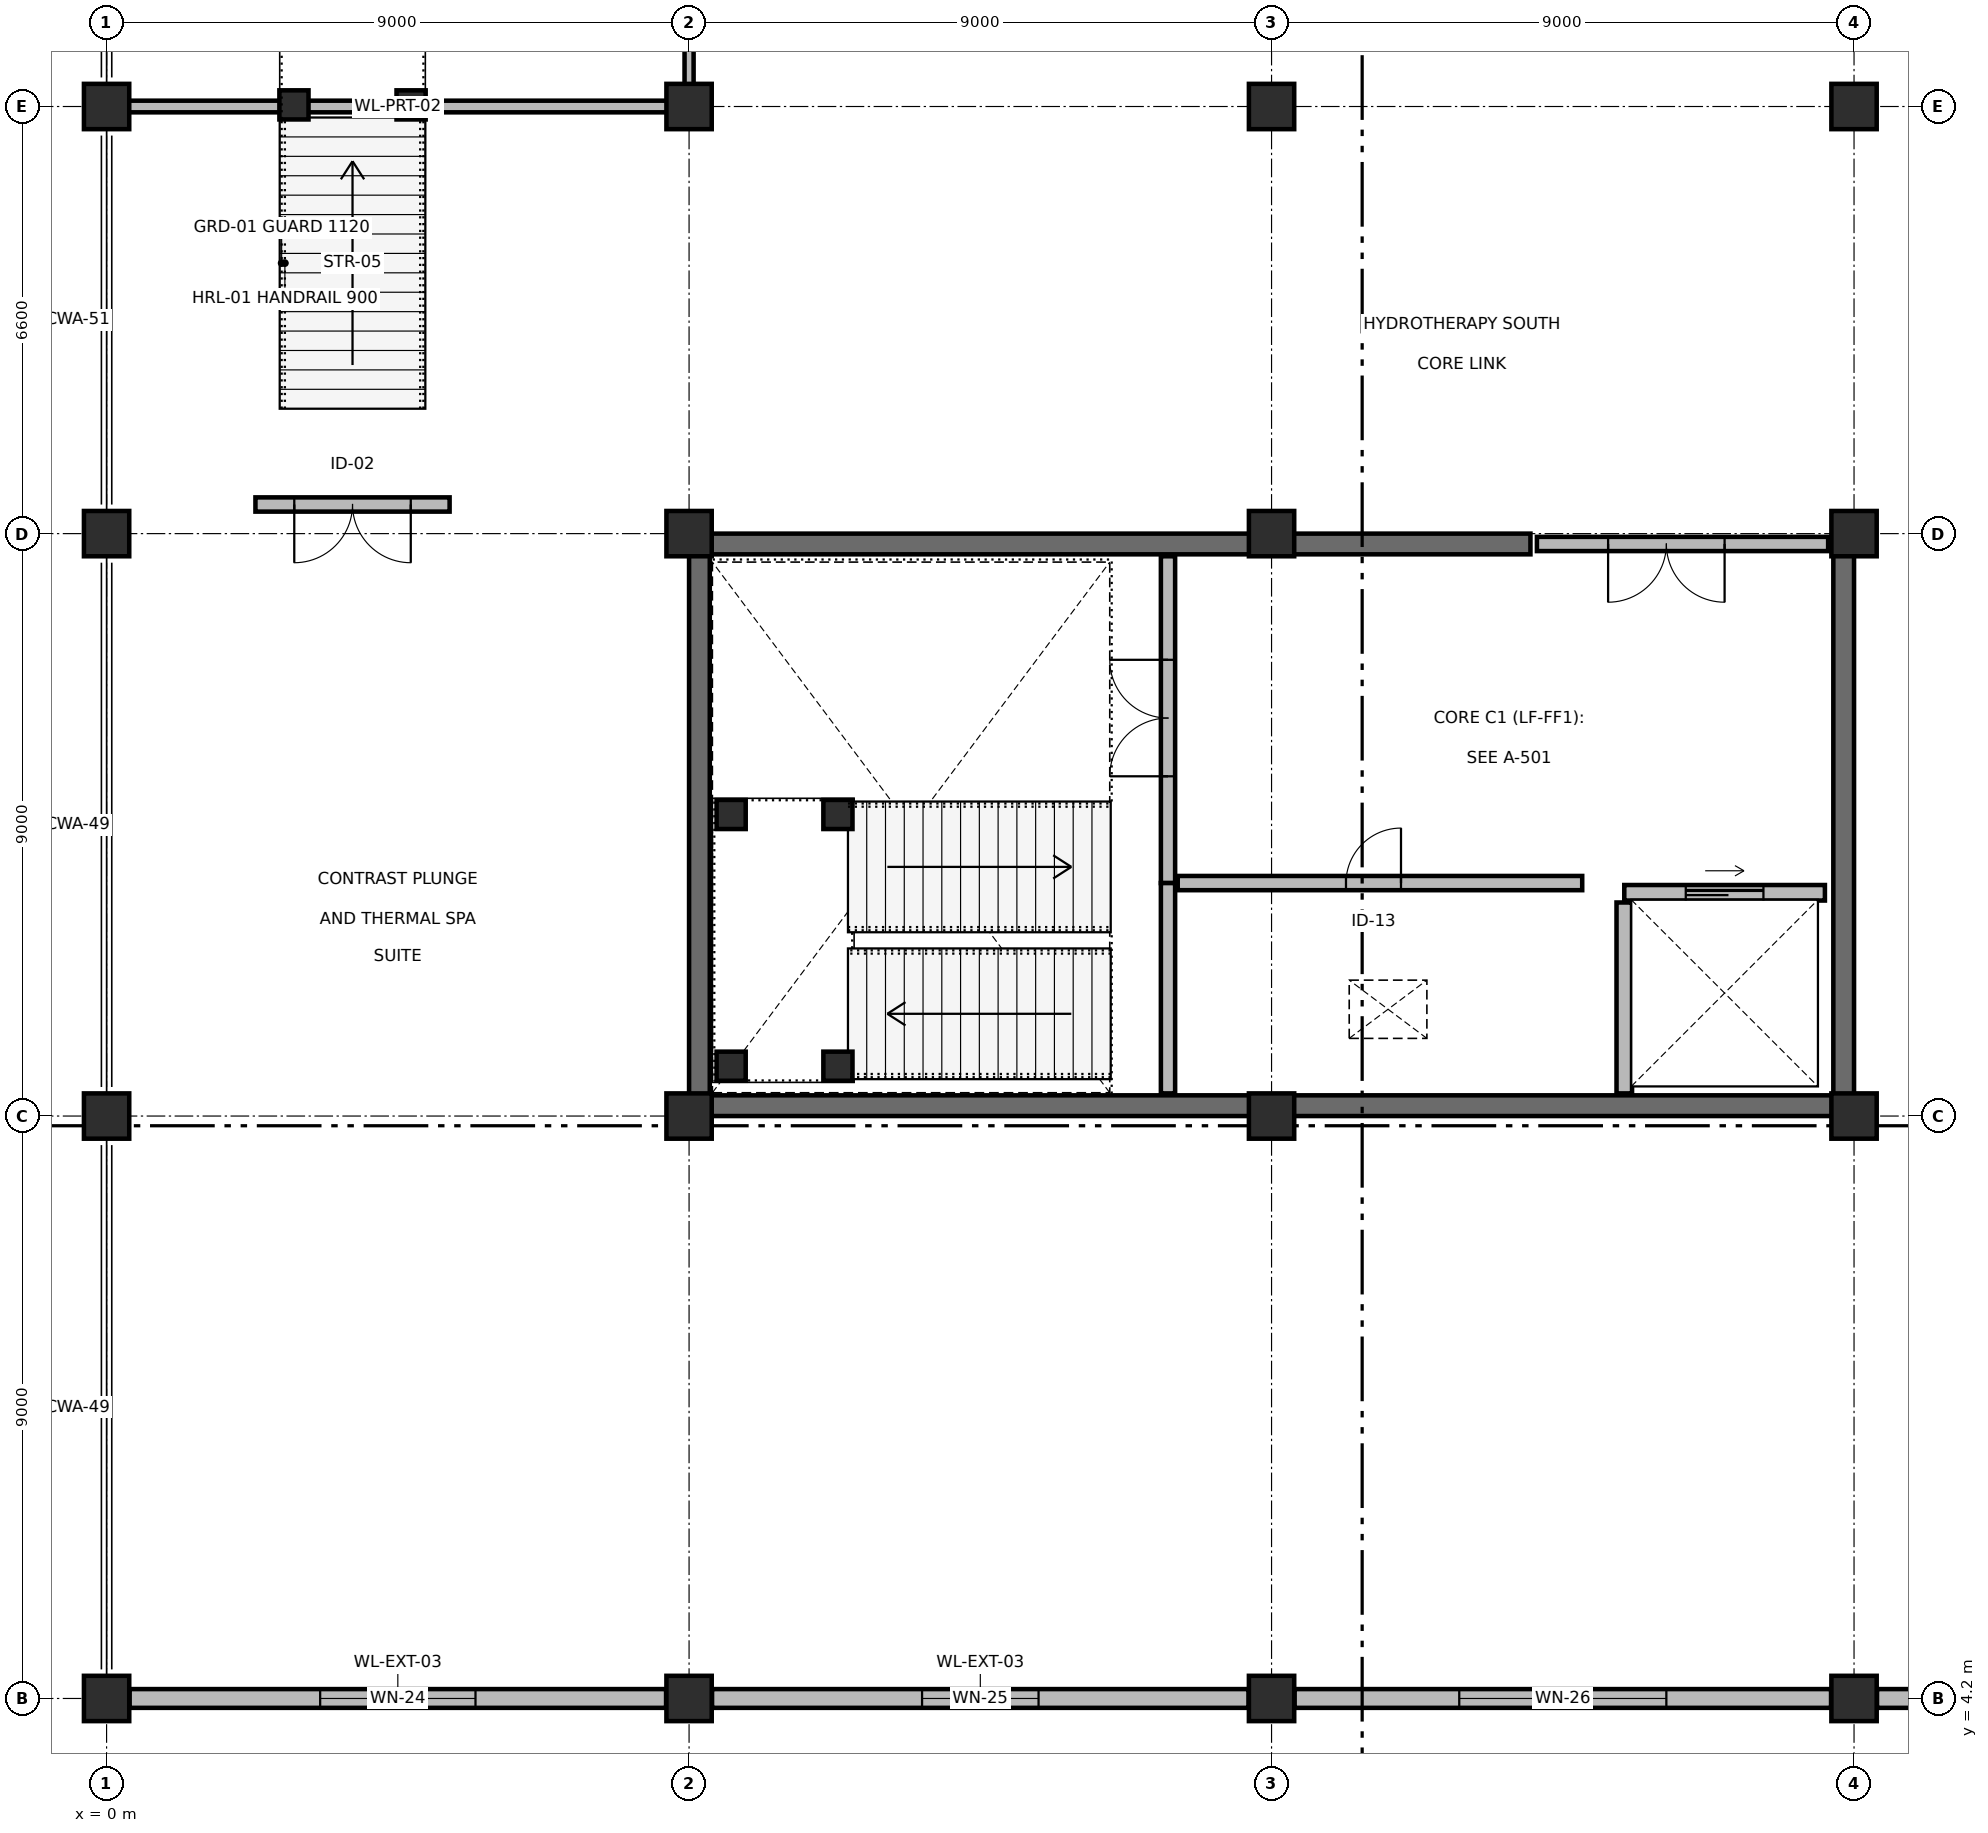
"""IFC4 building model, lengths in metres.
Left out: names, types, materials, properties, quantities, classifications, styles, units other than length and angle.
Written with IfcOpenShell. Run it as: python <this file> out.ifc"""

import sys

from ifc_helpers import new_model, si_unit, direction, frame, frame_2d, origin, origin_2d, place, context, subcontext, project, spatial, rectangle, extrude, element, fill, save


model = new_model("IFC4")
c1 = context("Model", 3, precision=1e-05, world=origin(), true_north=direction((0.0, 1.0)))
c2 = subcontext(c1, "Body", "Model", "MODEL_VIEW")
j1 = project(units=[si_unit("LENGTHUNIT", "METRE"), si_unit("PLANEANGLEUNIT", "RADIAN")], contexts=[c1])
p1 = place(None, origin())
s1 = spatial("IfcSite", under=j1, at=p1, CompositionType="ELEMENT")
p2 = place(p1, origin())
s2 = spatial("IfcBuilding", under=s1, at=p2, CompositionType="ELEMENT")
p3 = place(p2, frame((0.0, 0.0, 4.8)))
s3 = spatial("IfcBuildingStorey", under=s2, at=p3, CompositionType="ELEMENT", Elevation=4.8)
for number, where, z_axis, x_axis in (
    (1, (0.0, 4.2, 0.0), (0.0, 0.0, 1.0), (1.0, 0.0, 0.0)),
    (2, (0.0, 13.2, 0.0), (0.0, 0.0, 1.0), (1.0, 0.0, 0.0)),
    (3, (0.0, 22.2, 0.0), (0.0, 0.0, 1.0), (1.0, 0.0, 0.0)),
    (4, (0.0, 28.8, 0.0), (0.0, 0.0, 1.0), (1.0, 0.0, 0.0)),
    (5, (9.0, 4.2, 0.0), (0.0, 0.0, 1.0), (1.0, 0.0, 0.0)),
    (6, (9.0, 13.2, 0.0), (0.0, 0.0, 1.0), (1.0, 0.0, 0.0)),
    (7, (9.0, 22.2, 0.0), (0.0, 0.0, 1.0), (1.0, 0.0, 0.0)),
    (8, (9.0, 28.8, 0.0), (0.0, 0.0, 1.0), (1.0, 0.0, 0.0)),
    (9, (18.0, 4.2, 0.0), (0.0, 0.0, 1.0), (1.0, 0.0, 0.0)),
    (10, (18.0, 13.2, 0.0), (0.0, 0.0, 1.0), (1.0, 0.0, 0.0)),
    (11, (18.0, 22.2, 0.0), (0.0, 0.0, 1.0), (1.0, 0.0, 0.0)),
    (12, (18.0, 28.8, 0.0), (0.0, 0.0, 1.0), (1.0, 0.0, 0.0)),
    (13, (27.0, 4.2, 0.0), (0.0, 0.0, 1.0), (1.0, 0.0, 0.0)),
    (14, (27.0, 13.2, 0.0), (0.0, 0.0, 1.0), (1.0, 0.0, 0.0)),
    (15, (27.0, 22.2, 0.0), (0.0, 0.0, 1.0), (1.0, 0.0, 0.0)),
    (16, (27.0, 28.8, 0.0), (0.0, 0.0, 1.0), (1.0, 0.0, 0.0)),
):
    element("IfcColumn", number, at=place(p3, frame(where, z_axis=z_axis, x_axis=x_axis)), inside=s3, PredefinedType="COLUMN", context=c2, shape_type="SweptSolid", body=[
        extrude(rectangle(XDim=0.7, YDim=0.7, at=origin_2d()), origin(), (0.0, 0.0, 1.0), 4.8),
    ])
for number, where, z_axis, x_axis in (
    (17, (2.895, 28.825, 0.0), (0.0, 0.0, 1.0), (1.0, 0.0, 0.0)),
    (18, (4.705, 28.825, 0.0), (0.0, 0.0, 1.0), (1.0, 0.0, 0.0)),
):
    element("IfcColumn", number, at=place(p3, frame(where, z_axis=z_axis, x_axis=x_axis)), inside=s3, PredefinedType="COLUMN", context=c2, shape_type="SweptSolid", body=[
        extrude(rectangle(XDim=0.45, YDim=0.45, at=origin_2d()), origin(), (0.0, 0.0, 1.0), 2.24),
    ])
p4 = place(p3, frame((9.0, 13.36, 0.0), z_axis=(0.0, 0.0, 1.0), x_axis=(1.0, 0.0, 0.0)))
e19 = element("IfcWall", 19, at=p4, inside=s3, PredefinedType="SHEAR", context=c2, shape_type="SweptSolid", body=[
    extrude(rectangle(XDim=18.0, YDim=0.32, at=frame_2d((9.0, 0.0))), origin(), (0.0, 0.0, 1.0), 4.8),
])
p5 = place(p3, frame((9.0, 22.04, 0.0), z_axis=(0.0, 0.0, 1.0), x_axis=(1.0, 0.0, 0.0)))
e20 = element("IfcWall", 20, at=p5, inside=s3, PredefinedType="SHEAR", context=c2, shape_type="SweptSolid", body=[
    extrude(rectangle(XDim=13.0, YDim=0.32, at=frame_2d((6.5, 0.0))), origin(), (0.0, 0.0, 1.0), 4.8),
])
p6 = place(p3, frame((9.16, 13.52, 0.0), z_axis=(0.0, 0.0, 1.0), x_axis=(0.0, 1.0, 0.0)))
e21 = element("IfcWall", 21, at=p6, inside=s3, PredefinedType="SHEAR", context=c2, shape_type="SweptSolid", body=[
    extrude(rectangle(XDim=8.36, YDim=0.32, at=frame_2d((4.18, 0.0))), origin(), (0.0, 0.0, 1.0), 4.8),
])
p7 = place(p3, frame((26.84, 13.52, 0.0), z_axis=(0.0, 0.0, 1.0), x_axis=(0.0, 1.0, 0.0)))
e22 = element("IfcWall", 22, at=p7, inside=s3, PredefinedType="SHEAR", context=c2, shape_type="SweptSolid", body=[
    extrude(rectangle(XDim=8.48, YDim=0.32, at=frame_2d((4.24, 0.0))), origin(), (0.0, 0.0, 1.0), 4.8),
])
p8 = place(p3, frame((8.645, 4.2, 0.0), z_axis=(0.0, 0.0, 1.0), x_axis=(-1.0, 0.0, 0.0)))
e23 = element("IfcWall", 23, at=p8, inside=s3, PredefinedType="SOLIDWALL", context=c2, shape_type="SweptSolid", body=[
    extrude(rectangle(XDim=8.29, YDim=0.29, at=frame_2d((4.145, 0.0))), origin(), (0.0, 0.0, 1.0), 3.825),
])
p9 = place(p8, frame((2.945, 0.0, 0.85)))
e24 = element("IfcOpeningElement", 24, at=p9, cuts=e23, PredefinedType="OPENING", context=c2, shape_type="SweptSolid", body=[
    extrude(rectangle(XDim=2.4, YDim=2.0, at=frame_2d((1.2, 1.0))), frame((0.0, 0.155, 0.0), z_axis=(0.0, -1.0, 0.0), x_axis=(1.0, 0.0, 0.0)), (0.0, 0.0, 1.0), 0.31),
])
p10 = place(p3, frame((17.645, 4.2, 0.0), z_axis=(0.0, 0.0, 1.0), x_axis=(-1.0, 0.0, 0.0)))
e25 = element("IfcWall", 25, at=p10, inside=s3, PredefinedType="SOLIDWALL", context=c2, shape_type="SweptSolid", body=[
    extrude(rectangle(XDim=8.29, YDim=0.29, at=frame_2d((4.145, 0.0))), origin(), (0.0, 0.0, 1.0), 3.825),
])
p11 = place(p10, frame((3.245, 0.0, 0.85)))
e26 = element("IfcOpeningElement", 26, at=p11, cuts=e25, PredefinedType="OPENING", context=c2, shape_type="SweptSolid", body=[
    extrude(rectangle(XDim=1.8, YDim=2.0, at=frame_2d((0.9, 1.0))), frame((0.0, 0.155, 0.0), z_axis=(0.0, -1.0, 0.0), x_axis=(1.0, 0.0, 0.0)), (0.0, 0.0, 1.0), 0.31),
])
p12 = place(p3, frame((26.645, 4.2, 0.0), z_axis=(0.0, 0.0, 1.0), x_axis=(-1.0, 0.0, 0.0)))
e27 = element("IfcWall", 27, at=p12, inside=s3, PredefinedType="SOLIDWALL", context=c2, shape_type="SweptSolid", body=[
    extrude(rectangle(XDim=8.29, YDim=0.29, at=frame_2d((4.145, 0.0))), origin(), (0.0, 0.0, 1.0), 3.825),
])
p13 = place(p12, frame((2.545, 0.0, 0.85)))
e28 = element("IfcOpeningElement", 28, at=p13, cuts=e27, PredefinedType="OPENING", context=c2, shape_type="SweptSolid", body=[
    extrude(rectangle(XDim=3.2, YDim=2.2, at=frame_2d((1.6, 1.1))), frame((0.0, 0.155, 0.0), z_axis=(0.0, -1.0, 0.0), x_axis=(1.0, 0.0, 0.0)), (0.0, 0.0, 1.0), 0.31),
])
p14 = place(p3, frame((35.745, 4.2, 0.0), z_axis=(0.0, 0.0, 1.0), x_axis=(-1.0, 0.0, 0.0)))
e29 = element("IfcWall", 29, at=p14, inside=s3, PredefinedType="SOLIDWALL", context=c2, shape_type="SweptSolid", body=[
    extrude(rectangle(XDim=8.39, YDim=0.29, at=frame_2d((4.195, 0.0))), origin(), (0.0, 0.0, 1.0), 3.825),
])
p15 = place(p14, frame((2.895, 0.0, 0.85)))
e30 = element("IfcOpeningElement", 30, at=p15, cuts=e29, PredefinedType="OPENING", context=c2, shape_type="SweptSolid", body=[
    extrude(rectangle(XDim=2.6, YDim=2.2, at=frame_2d((1.3, 1.1))), frame((0.0, 0.155, 0.0), z_axis=(0.0, -1.0, 0.0), x_axis=(1.0, 0.0, 0.0)), (0.0, 0.0, 1.0), 0.31),
])
p16 = place(p3, frame((16.4, 21.85, 0.0), z_axis=(0.0, 0.0, 1.0), x_axis=(0.0, -1.0, 0.0)))
e31 = element("IfcWall", 31, at=p16, inside=s3, PredefinedType="PARTITIONING", context=c2, shape_type="SweptSolid", body=[
    extrude(rectangle(XDim=5.05, YDim=0.22, at=frame_2d((2.525, 0.0))), origin(), (0.0, 0.0, 1.0), 3.875),
])
p17 = place(p16, frame((1.6, 0.0, 0.0)))
e32 = element("IfcOpeningElement", 32, at=p17, cuts=e31, PredefinedType="OPENING", context=c2, shape_type="SweptSolid", body=[
    extrude(rectangle(XDim=1.8, YDim=2.2, at=frame_2d((0.9, 1.1))), frame((0.0, 0.12, 0.0), z_axis=(0.0, -1.0, 0.0), x_axis=(1.0, 0.0, 0.0)), (0.0, 0.0, 1.0), 0.24),
])
p18 = place(p3, frame((16.4, 13.55, 0.0), z_axis=(0.0, 0.0, 1.0), x_axis=(0.0, 1.0, 0.0)))
e33 = element("IfcWall", 33, at=p18, inside=s3, PredefinedType="PARTITIONING", context=c2, shape_type="SweptSolid", body=[
    extrude(rectangle(XDim=3.25, YDim=0.22, at=frame_2d((1.625, 0.0))), origin(), (0.0, 0.0, 1.0), 3.875),
])
p19 = place(p3, frame((16.55, 16.8, 0.0), z_axis=(0.0, 0.0, 1.0), x_axis=(1.0, 0.0, 0.0)))
e34 = element("IfcWall", 34, at=p19, inside=s3, PredefinedType="PARTITIONING", context=c2, shape_type="SweptSolid", body=[
    extrude(rectangle(XDim=6.25, YDim=0.22, at=frame_2d((3.125, 0.0))), origin(), (0.0, 0.0, 1.0), 3.925),
])
p20 = place(p19, frame((2.6, 0.0, 0.0)))
e35 = element("IfcOpeningElement", 35, at=p20, cuts=e34, PredefinedType="OPENING", context=c2, shape_type="SweptSolid", body=[
    extrude(rectangle(XDim=0.85, YDim=2.05, at=frame_2d((0.425, 1.025))), frame((0.0, 0.12, 0.0), z_axis=(0.0, -1.0, 0.0), x_axis=(1.0, 0.0, 0.0)), (0.0, 0.0, 1.0), 0.24),
])
p21 = place(p3, frame((23.45, 16.65, 0.0), z_axis=(0.0, 0.0, 1.0), x_axis=(1.0, 0.0, 0.0)))
e36 = element("IfcWall", 36, at=p21, inside=s3, PredefinedType="SOLIDWALL", context=c2, shape_type="SweptSolid", body=[
    extrude(rectangle(XDim=3.1, YDim=0.24, at=frame_2d((1.55, 0.0))), origin(), (0.0, 0.0, 1.0), 4.505),
])
p22 = place(p21, frame((0.95, 0.0, 0.0)))
e37 = element("IfcOpeningElement", 37, at=p22, cuts=e36, PredefinedType="OPENING", context=c2, shape_type="SweptSolid", body=[
    extrude(rectangle(XDim=1.2, YDim=2.2, at=frame_2d((0.6, 1.1))), frame((0.0, 0.13, 0.0), z_axis=(0.0, -1.0, 0.0), x_axis=(1.0, 0.0, 0.0)), (0.0, 0.0, 1.0), 0.26),
])
p23 = place(p3, frame((23.45, 13.55, 0.0), z_axis=(0.0, 0.0, 1.0), x_axis=(0.0, 1.0, 0.0)))
e38 = element("IfcWall", 38, at=p23, inside=s3, PredefinedType="SOLIDWALL", context=c2, shape_type="SweptSolid", body=[
    extrude(rectangle(XDim=2.95, YDim=0.24, at=frame_2d((1.475, 0.0))), origin(), (0.0, 0.0, 1.0), 3.875),
])
p24 = place(p3, frame((22.1, 22.04, 0.0), z_axis=(0.0, 0.0, 1.0), x_axis=(1.0, 0.0, 0.0)))
e39 = element("IfcWall", 39, at=p24, inside=s3, PredefinedType="PARTITIONING", context=c2, shape_type="SweptSolid", body=[
    extrude(rectangle(XDim=4.5, YDim=0.22, at=frame_2d((2.25, 0.0))), origin(), (0.0, 0.0, 1.0), 3.875),
])
p25 = place(p24, frame((1.1, 0.0, 0.0)))
e40 = element("IfcOpeningElement", 40, at=p25, cuts=e39, PredefinedType="OPENING", context=c2, shape_type="SweptSolid", body=[
    extrude(rectangle(XDim=1.8, YDim=2.2, at=frame_2d((0.9, 1.1))), frame((0.0, 0.12, 0.0), z_axis=(0.0, -1.0, 0.0), x_axis=(1.0, 0.0, 0.0)), (0.0, 0.0, 1.0), 0.24),
])
p26 = place(p3, frame((0.0, 28.8, 0.0), z_axis=(0.0, 0.0, 1.0), x_axis=(1.0, 0.0, 0.0)))
e41 = element("IfcWall", 41, at=p26, inside=s3, PredefinedType="PARTITIONING", context=c2, shape_type="SweptSolid", body=[
    extrude(rectangle(XDim=9.0, YDim=0.18, at=frame_2d((4.5, 0.0))), origin(), (0.0, 0.0, 1.0), 3.775),
])
p27 = place(p3, frame((9.0, 28.8, 0.0), z_axis=(0.0, 0.0, 1.0), x_axis=(0.0, 1.0, 0.0)))
e42 = element("IfcWall", 42, at=p27, inside=s3, PredefinedType="PARTITIONING", context=c2, shape_type="SweptSolid", body=[
    extrude(rectangle(XDim=30.6, YDim=0.14, at=frame_2d((15.3, 0.0))), origin(), (0.0, 0.0, 1.0), 3.775),
])
for number, where, z_axis, x_axis in (
    (43, (9.65, 13.97, 0.0), (0.0, 0.0, 1.0), (1.0, 0.0, 0.0)),
    (44, (11.3, 13.97, 0.0), (0.0, 0.0, 1.0), (1.0, 0.0, 0.0)),
    (45, (9.65, 17.86, 0.0), (0.0, 0.0, 1.0), (1.0, 0.0, 0.0)),
    (46, (11.3, 17.86, 0.0), (0.0, 0.0, 1.0), (1.0, 0.0, 0.0)),
):
    element("IfcColumn", number, at=place(p3, frame(where, z_axis=z_axis, x_axis=x_axis)), inside=s3, PredefinedType="COLUMN", context=c2, shape_type="SweptSolid", body=[
        extrude(rectangle(XDim=0.45, YDim=0.45, at=origin_2d()), origin(), (0.0, 0.0, 1.0), 4.8),
    ])
p28 = place(p3, frame((2.3, 22.65, 0.0), z_axis=(0.0, 0.0, 1.0), x_axis=(1.0, 0.0, 0.0)))
e47 = element("IfcWall", 47, at=p28, inside=s3, PredefinedType="PARTITIONING", context=c2, shape_type="SweptSolid", body=[
    extrude(rectangle(XDim=3.0, YDim=0.22, at=frame_2d((1.5, 0.0))), origin(), (0.0, 0.0, 1.0), 4.385),
])
p29 = place(p28, frame((0.6, 0.0, 0.0)))
e48 = element("IfcOpeningElement", 48, at=p29, cuts=e47, PredefinedType="OPENING", context=c2, shape_type="SweptSolid", body=[
    extrude(rectangle(XDim=1.8, YDim=2.2, at=frame_2d((0.9, 1.1))), frame((0.0, 0.12, 0.0), z_axis=(0.0, -1.0, 0.0), x_axis=(1.0, 0.0, 0.0)), (0.0, 0.0, 1.0), 0.24),
])
p30 = place(p9, origin())
e49 = element("IfcWindow", 49, at=p30, inside=s3, PartitioningType="SINGLE_PANEL", PredefinedType="WINDOW", context=c2, shape_type="SweptSolid", body=[
    extrude(rectangle(XDim=2.4, YDim=2.0, at=frame_2d((1.2, 1.0))), frame((0.0, 0.03, 0.0), z_axis=(0.0, -1.0, 0.0), x_axis=(1.0, 0.0, 0.0)), (0.0, 0.0, 1.0), 0.06),
])
fill(e24, e49)
p31 = place(p11, origin())
e50 = element("IfcWindow", 50, at=p31, inside=s3, PartitioningType="SINGLE_PANEL", PredefinedType="WINDOW", context=c2, shape_type="SweptSolid", body=[
    extrude(rectangle(XDim=1.8, YDim=2.0, at=frame_2d((0.9, 1.0))), frame((0.0, 0.03, 0.0), z_axis=(0.0, -1.0, 0.0), x_axis=(1.0, 0.0, 0.0)), (0.0, 0.0, 1.0), 0.06),
])
fill(e26, e50)
p32 = place(p13, origin())
e51 = element("IfcWindow", 51, at=p32, inside=s3, PartitioningType="SINGLE_PANEL", PredefinedType="WINDOW", context=c2, shape_type="SweptSolid", body=[
    extrude(rectangle(XDim=3.2, YDim=2.2, at=frame_2d((1.6, 1.1))), frame((0.0, 0.03, 0.0), z_axis=(0.0, -1.0, 0.0), x_axis=(1.0, 0.0, 0.0)), (0.0, 0.0, 1.0), 0.06),
])
fill(e28, e51)
p33 = place(p17, origin())
e52 = element("IfcDoor", 52, at=p33, inside=s3, OperationType="DOUBLE_DOOR_SINGLE_SWING", PredefinedType="DOOR", context=c2, shape_type="SweptSolid", body=[
    extrude(rectangle(XDim=1.8, YDim=2.2, at=frame_2d((0.9, 1.1))), frame((0.0, 0.025, 0.0), z_axis=(0.0, -1.0, 0.0), x_axis=(1.0, 0.0, 0.0)), (0.0, 0.0, 1.0), 0.05),
])
fill(e32, e52)
p34 = place(p20, origin())
e53 = element("IfcDoor", 53, at=p34, inside=s3, OperationType="SINGLE_SWING_RIGHT", PredefinedType="DOOR", context=c2, shape_type="SweptSolid", body=[
    extrude(rectangle(XDim=0.85, YDim=2.05, at=frame_2d((0.425, 1.025))), frame((0.0, 0.025, 0.0), z_axis=(0.0, -1.0, 0.0), x_axis=(1.0, 0.0, 0.0)), (0.0, 0.0, 1.0), 0.05),
])
fill(e35, e53)
p35 = place(p22, origin())
e54 = element("IfcDoor", 54, at=p35, inside=s3, OperationType="DOUBLE_DOOR_SLIDING", PredefinedType="DOOR", context=c2, shape_type="SweptSolid", body=[
    extrude(rectangle(XDim=1.2, YDim=2.2, at=frame_2d((0.6, 1.1))), frame((0.0, 0.025, 0.0), z_axis=(0.0, -1.0, 0.0), x_axis=(1.0, 0.0, 0.0)), (0.0, 0.0, 1.0), 0.05),
])
fill(e37, e54)
p36 = place(p25, origin())
e55 = element("IfcDoor", 55, at=p36, inside=s3, OperationType="DOUBLE_DOOR_SINGLE_SWING", PredefinedType="DOOR", context=c2, shape_type="SweptSolid", body=[
    extrude(rectangle(XDim=1.8, YDim=2.2, at=frame_2d((0.9, 1.1))), frame((0.0, 0.025, 0.0), z_axis=(0.0, -1.0, 0.0), x_axis=(1.0, 0.0, 0.0)), (0.0, 0.0, 1.0), 0.05),
])
fill(e40, e55)
p37 = place(p29, origin())
e56 = element("IfcDoor", 56, at=p37, inside=s3, OperationType="DOUBLE_DOOR_SINGLE_SWING", PredefinedType="DOOR", context=c2, shape_type="SweptSolid", body=[
    extrude(rectangle(XDim=1.8, YDim=2.2, at=frame_2d((0.9, 1.1))), frame((0.0, 0.025, 0.0), z_axis=(0.0, -1.0, 0.0), x_axis=(1.0, 0.0, 0.0)), (0.0, 0.0, 1.0), 0.05),
])
fill(e48, e56)
save(model, sys.argv[1])
